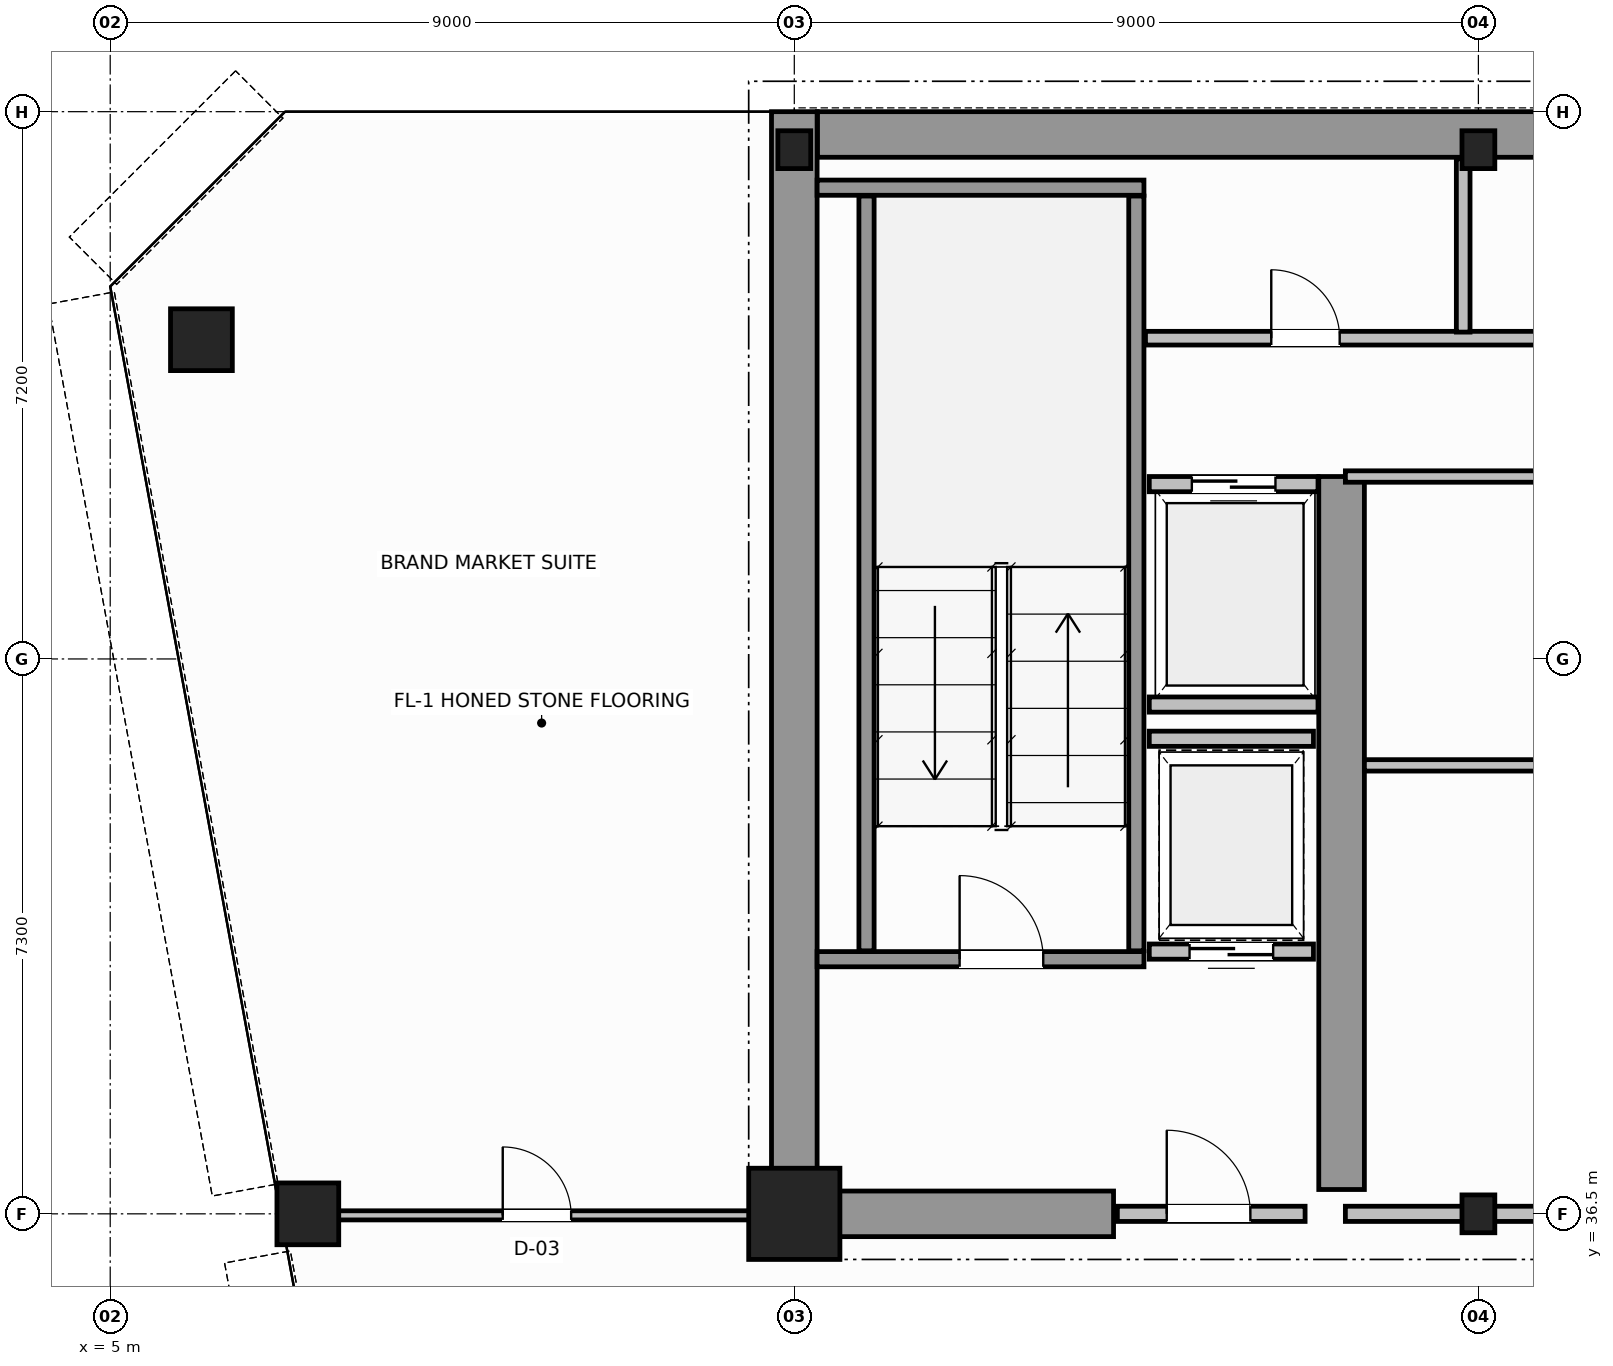
"""IFC4 building model, lengths in metres.
Left out: names, types, materials, properties, quantities, classifications, styles, units other than length and angle.
Written with IfcOpenShell. Run it as: python <this file> out.ifc"""

import sys

from ifc_helpers import new_model, si_unit, direction, frame, frame_2d, origin, origin_2d, place, context, subcontext, project, spatial, rectangle, hollow_circle, i_section, extrude, source, transform, mapped, element, fill, save


model = new_model("IFC4")
c1 = context("Model", 3, precision=1e-05, world=origin(), true_north=direction((0.0, 1.0)))
c2 = subcontext(c1, "Body", "Model", "MODEL_VIEW")
j1 = project(units=[si_unit("LENGTHUNIT", "METRE"), si_unit("PLANEANGLEUNIT", "RADIAN")], contexts=[c1])
p1 = place(None, origin())
s1 = spatial("IfcSite", under=j1, at=p1, CompositionType="ELEMENT")
p2 = place(p1, origin())
s2 = spatial("IfcBuilding", under=s1, at=p2, CompositionType="ELEMENT")
p3 = place(p2, frame((0.0, 0.0, 188.0)))
s3 = spatial("IfcBuildingStorey", under=s2, at=p3, CompositionType="ELEMENT", Elevation=188.0)
m1 = source(origin(), c2, "Body", "SweptSolid", [
    extrude(rectangle(XDim=1.2, YDim=1.2, at=origin_2d()), origin(), (0.0, 0.0, 1.0), 3.8),
])
p4 = place(p3, frame((14.0, 36.5, 0.0), z_axis=(0.0, 0.0, 1.0), x_axis=(1.0, 0.0, 0.0)))
e1 = element("IfcColumn", 1, at=p4, inside=s3, PredefinedType="COLUMN", context=c2, shape_type="MappedRepresentation", body=[
    mapped(m1, transform((0.0, 0.0, 0.0), scale=1.0)),
])
m2 = source(origin(), c2, "Body", "SweptSolid", [
    extrude(i_section(OverallWidth=0.432, OverallDepth=0.498, WebThickness=0.055, FlangeThickness=0.068, FilletRadius=0.015, at=origin_2d()), origin(), (0.0, 0.0, 1.0), 3.8),
])
for number, where, z_axis, x_axis in (
    (2, (23.0, 36.5, 0.0), (0.0, 0.0, 1.0), (1.0, 0.0, 0.0)),
    (3, (14.0, 50.5, 0.0), (0.0, 0.0, 1.0), (1.0, 0.0, 0.0)),
    (4, (23.0, 50.5, 0.0), (0.0, 0.0, 1.0), (1.0, 0.0, 0.0)),
):
    element("IfcColumn", number, at=place(p3, frame(where, z_axis=z_axis, x_axis=x_axis)), inside=s3, PredefinedType="COLUMN", context=c2, shape_type="MappedRepresentation", body=[
        mapped(m2, transform((0.0, 0.0, 0.0), scale=1.0)),
    ])
m3 = source(origin(), c2, "Body", "SweptSolid", [
    extrude(hollow_circle(Radius=0.406, WallThickness=0.04, at=origin_2d()), origin(), (0.0, 0.0, 1.0), 3.8),
])
for number, where, z_axis, x_axis in (
    (5, (6.2, 48.0, 0.0), (0.0, 0.0, 1.0), (1.0, 0.0, 0.0)),
    (6, (7.6, 36.5, 0.0), (0.0, 0.0, 1.0), (1.0, 0.0, 0.0)),
):
    element("IfcColumn", number, at=place(p3, frame(where, z_axis=z_axis, x_axis=x_axis)), inside=s3, PredefinedType="COLUMN", context=c2, shape_type="MappedRepresentation", body=[
        mapped(m3, transform((0.0, 0.0, 0.0), scale=1.0)),
    ])
p5 = place(p3, frame((14.304, 50.7, 0.0), z_axis=(0.0, 0.0, 1.0), x_axis=(1.0, 0.0, 0.0)))
e7 = element("IfcWall", 7, at=p5, inside=s3, PredefinedType="SHEAR", context=c2, shape_type="SweptSolid", body=[
    extrude(rectangle(XDim=19.694, YDim=0.6, at=frame_2d((9.847, 0.0))), origin(), (0.0, 0.0, 1.0), 3.8),
])
p6 = place(p3, frame((14.0, 36.5, 0.0), z_axis=(0.0, 0.0, 1.0), x_axis=(0.0, 1.0, 0.0)))
e8 = element("IfcWall", 8, at=p6, inside=s3, PredefinedType="SHEAR", context=c2, shape_type="SweptSolid", body=[
    extrude(rectangle(XDim=14.5, YDim=0.6, at=frame_2d((7.25, 0.0))), origin(), (0.0, 0.0, 1.0), 3.8),
])
p7 = place(p3, frame((14.32, 36.5, 0.0), z_axis=(0.0, 0.0, 1.0), x_axis=(1.0, 0.0, 0.0)))
e9 = element("IfcWall", 9, at=p7, inside=s3, PredefinedType="SHEAR", context=c2, shape_type="SweptSolid", body=[
    extrude(rectangle(XDim=3.88, YDim=0.6, at=frame_2d((1.94, 0.0))), origin(), (0.0, 0.0, 1.0), 2.58),
])
p8 = place(p3, frame((21.2, 36.82, 0.0), z_axis=(0.0, 0.0, 1.0), x_axis=(0.0, 1.0, 0.0)))
e10 = element("IfcWall", 10, at=p8, inside=s3, PredefinedType="SHEAR", context=c2, shape_type="SweptSolid", body=[
    extrude(rectangle(XDim=9.38, YDim=0.6, at=frame_2d((4.69, 0.0))), origin(), (0.0, 0.0, 1.0), 3.8),
])
p9 = place(p3, frame((14.3, 39.85, 0.0), z_axis=(0.0, 0.0, 1.0), x_axis=(1.0, 0.0, 0.0)))
e11 = element("IfcWall", 11, at=p9, inside=s3, PredefinedType="SOLIDWALL", context=c2, shape_type="SweptSolid", body=[
    extrude(rectangle(XDim=4.3, YDim=0.2, at=frame_2d((2.15, 0.0))), origin(), (0.0, 0.0, 1.0), 3.8),
])
p10 = place(p9, frame((1.875, 0.0, 0.0)))
e12 = element("IfcOpeningElement", 12, at=p10, cuts=e11, PredefinedType="OPENING", context=c2, shape_type="SweptSolid", body=[
    extrude(rectangle(XDim=1.1, YDim=2.15, at=frame_2d((0.55, 1.075))), frame((0.0, 0.11, 0.0), z_axis=(0.0, -1.0, 0.0), x_axis=(1.0, 0.0, 0.0)), (0.0, 0.0, 1.0), 0.22),
])
p11 = place(p3, frame((14.3, 50.0, 0.0), z_axis=(0.0, 0.0, 1.0), x_axis=(1.0, 0.0, 0.0)))
e13 = element("IfcWall", 13, at=p11, inside=s3, PredefinedType="SOLIDWALL", context=c2, shape_type="SweptSolid", body=[
    extrude(rectangle(XDim=4.3, YDim=0.2, at=frame_2d((2.15, 0.0))), origin(), (0.0, 0.0, 1.0), 3.8),
])
for number, where, z_axis, x_axis in (
    (14, (14.95, 39.96, 0.0), (0.0, 0.0, 1.0), (0.0, 1.0, 0.0)),
    (15, (18.5, 39.96, 0.0), (0.0, 0.0, 1.0), (0.0, 1.0, 0.0)),
):
    element("IfcWall", number, at=place(p3, frame(where, z_axis=z_axis, x_axis=x_axis)), inside=s3, PredefinedType="SOLIDWALL", context=c2, shape_type="SweptSolid", body=[
        extrude(rectangle(XDim=9.93, YDim=0.2, at=frame_2d((4.965, 0.0))), origin(), (0.0, 0.0, 1.0), 3.8),
    ])
p12 = place(p3, frame((18.25, 36.5, 0.0), z_axis=(0.0, 0.0, 1.0), x_axis=(1.0, 0.0, 0.0)))
e16 = element("IfcWall", 16, at=p12, inside=s3, PredefinedType="SOLIDWALL", context=c2, shape_type="SweptSolid", body=[
    extrude(rectangle(XDim=2.47, YDim=0.2, at=frame_2d((1.235, 0.0))), origin(), (0.0, 0.0, 1.0), 2.57),
])
p13 = place(p12, frame((0.65, 0.0, 0.0)))
e17 = element("IfcOpeningElement", 17, at=p13, cuts=e16, PredefinedType="OPENING", context=c2, shape_type="SweptSolid", body=[
    extrude(rectangle(XDim=1.1, YDim=2.15, at=frame_2d((0.55, 1.075))), frame((0.0, 0.11, 0.0), z_axis=(0.0, -1.0, 0.0), x_axis=(1.0, 0.0, 0.0)), (0.0, 0.0, 1.0), 0.22),
])
p14 = place(p3, frame((18.67, 46.1, 0.0), z_axis=(0.0, 0.0, 1.0), x_axis=(1.0, 0.0, 0.0)))
e18 = element("IfcWall", 18, at=p14, inside=s3, PredefinedType="SOLIDWALL", context=c2, shape_type="SweptSolid", body=[
    extrude(rectangle(XDim=2.22, YDim=0.2, at=frame_2d((1.11, 0.0))), origin(), (0.0, 0.0, 1.0), 3.58),
])
p15 = place(p14, frame((0.56, 0.0, 0.0)))
e19 = element("IfcOpeningElement", 19, at=p15, cuts=e18, PredefinedType="OPENING", context=c2, shape_type="SweptSolid", body=[
    extrude(rectangle(XDim=1.1, YDim=2.15, at=frame_2d((0.55, 1.075))), frame((0.0, 0.11, 0.0), z_axis=(0.0, -1.0, 0.0), x_axis=(1.0, 0.0, 0.0)), (0.0, 0.0, 1.0), 0.22),
])
p16 = place(p3, frame((18.67, 43.2, 0.0), z_axis=(0.0, 0.0, 1.0), x_axis=(1.0, 0.0, 0.0)))
e20 = element("IfcWall", 20, at=p16, inside=s3, PredefinedType="SOLIDWALL", context=c2, shape_type="SweptSolid", body=[
    extrude(rectangle(XDim=2.22, YDim=0.2, at=frame_2d((1.11, 0.0))), origin(), (0.0, 0.0, 1.0), 3.58),
])
p17 = place(p3, frame((18.67, 39.95, 0.0), z_axis=(0.0, 0.0, 1.0), x_axis=(1.0, 0.0, 0.0)))
e21 = element("IfcWall", 21, at=p17, inside=s3, PredefinedType="SOLIDWALL", context=c2, shape_type="SweptSolid", body=[
    extrude(rectangle(XDim=2.16, YDim=0.2, at=frame_2d((1.08, 0.0))), origin(), (0.0, 0.0, 1.0), 3.58),
])
p18 = place(p17, frame((0.53, 0.0, 0.0)))
e22 = element("IfcOpeningElement", 22, at=p18, cuts=e21, PredefinedType="OPENING", context=c2, shape_type="SweptSolid", body=[
    extrude(rectangle(XDim=1.1, YDim=2.15, at=frame_2d((0.55, 1.075))), frame((0.0, 0.11, 0.0), z_axis=(0.0, -1.0, 0.0), x_axis=(1.0, 0.0, 0.0)), (0.0, 0.0, 1.0), 0.22),
])
p19 = place(p3, frame((18.67, 42.75, 0.0), z_axis=(0.0, 0.0, 1.0), x_axis=(1.0, 0.0, 0.0)))
e23 = element("IfcWall", 23, at=p19, inside=s3, PredefinedType="SOLIDWALL", context=c2, shape_type="SweptSolid", body=[
    extrude(rectangle(XDim=2.16, YDim=0.2, at=frame_2d((1.08, 0.0))), origin(), (0.0, 0.0, 1.0), 3.58),
])
p20 = place(p3, frame((21.25, 36.5, 0.0), z_axis=(0.0, 0.0, 1.0), x_axis=(1.0, 0.0, 0.0)))
e24 = element("IfcWall", 24, at=p20, inside=s3, PredefinedType="SOLIDWALL", context=c2, shape_type="SweptSolid", body=[
    extrude(rectangle(XDim=6.27, YDim=0.2, at=frame_2d((3.135, 0.0))), origin(), (0.0, 0.0, 1.0), 2.57),
])
p21 = place(p20, frame((2.6, 0.0, 0.0)))
e25 = element("IfcOpeningElement", 25, at=p21, cuts=e24, PredefinedType="OPENING", context=c2, shape_type="SweptSolid", body=[
    extrude(rectangle(XDim=1.1, YDim=2.15, at=frame_2d((0.55, 1.075))), frame((0.0, 0.11, 0.0), z_axis=(0.0, -1.0, 0.0), x_axis=(1.0, 0.0, 0.0)), (0.0, 0.0, 1.0), 0.22),
])
p22 = place(p3, frame((21.25, 46.2, 0.0), z_axis=(0.0, 0.0, 1.0), x_axis=(1.0, 0.0, 0.0)))
e26 = element("IfcWall", 26, at=p22, inside=s3, PredefinedType="PARTITIONING", context=c2, shape_type="SweptSolid", body=[
    extrude(rectangle(XDim=8.5, YDim=0.15, at=frame_2d((4.25, 0.0))), origin(), (0.0, 0.0, 1.0), 3.58),
])
p23 = place(p3, frame((21.5, 42.4, 0.0), z_axis=(0.0, 0.0, 1.0), x_axis=(1.0, 0.0, 0.0)))
e27 = element("IfcWall", 27, at=p23, inside=s3, PredefinedType="PARTITIONING", context=c2, shape_type="SweptSolid", body=[
    extrude(rectangle(XDim=8.0, YDim=0.15, at=frame_2d((4.0, 0.0))), origin(), (0.0, 0.0, 1.0), 3.58),
])
p24 = place(p23, frame((3.4, 0.0, 0.0)))
e28 = element("IfcOpeningElement", 28, at=p24, cuts=e27, PredefinedType="OPENING", context=c2, shape_type="SweptSolid", body=[
    extrude(rectangle(XDim=0.9, YDim=2.1, at=frame_2d((0.45, 1.05))), frame((0.0, 0.085, 0.0), z_axis=(0.0, -1.0, 0.0), x_axis=(1.0, 0.0, 0.0)), (0.0, 0.0, 1.0), 0.17),
])
p25 = place(p3, frame((18.62, 48.02, 0.0), z_axis=(0.0, 0.0, 1.0), x_axis=(1.0, 0.0, 0.0)))
e29 = element("IfcWall", 29, at=p25, inside=s3, PredefinedType="PLUMBINGWALL", context=c2, shape_type="SweptSolid", body=[
    extrude(rectangle(XDim=30.76, YDim=0.18, at=frame_2d((15.38, 0.0))), origin(), (0.0, 0.0, 1.0), 3.58),
])
p26 = place(p25, frame((1.655, 0.0, 0.0)))
e30 = element("IfcOpeningElement", 30, at=p26, cuts=e29, PredefinedType="OPENING", context=c2, shape_type="SweptSolid", body=[
    extrude(rectangle(XDim=0.9, YDim=2.15, at=frame_2d((0.45, 1.075))), frame((0.0, 0.1, 0.0), z_axis=(0.0, -1.0, 0.0), x_axis=(1.0, 0.0, 0.0)), (0.0, 0.0, 1.0), 0.2),
])
p27 = place(p25, frame((6.03, 0.0, 0.0)))
e31 = element("IfcOpeningElement", 31, at=p27, cuts=e29, PredefinedType="OPENING", context=c2, shape_type="SweptSolid", body=[
    extrude(rectangle(XDim=0.9, YDim=2.15, at=frame_2d((0.45, 1.075))), frame((0.0, 0.1, 0.0), z_axis=(0.0, -1.0, 0.0), x_axis=(1.0, 0.0, 0.0)), (0.0, 0.0, 1.0), 0.2),
])
p28 = place(p25, frame((10.93, 0.0, 0.0)))
e32 = element("IfcOpeningElement", 32, at=p28, cuts=e29, PredefinedType="OPENING", context=c2, shape_type="SweptSolid", body=[
    extrude(rectangle(XDim=0.9, YDim=2.15, at=frame_2d((0.45, 1.075))), frame((0.0, 0.1, 0.0), z_axis=(0.0, -1.0, 0.0), x_axis=(1.0, 0.0, 0.0)), (0.0, 0.0, 1.0), 0.2),
])
p29 = place(p25, frame((16.13, 0.0, 0.0)))
e33 = element("IfcOpeningElement", 33, at=p29, cuts=e29, PredefinedType="OPENING", context=c2, shape_type="SweptSolid", body=[
    extrude(rectangle(XDim=0.9, YDim=2.15, at=frame_2d((0.45, 1.075))), frame((0.0, 0.1, 0.0), z_axis=(0.0, -1.0, 0.0), x_axis=(1.0, 0.0, 0.0)), (0.0, 0.0, 1.0), 0.2),
])
p30 = place(p25, frame((21.73, 0.0, 0.0)))
e34 = element("IfcOpeningElement", 34, at=p30, cuts=e29, PredefinedType="OPENING", context=c2, shape_type="SweptSolid", body=[
    extrude(rectangle(XDim=0.9, YDim=2.15, at=frame_2d((0.45, 1.075))), frame((0.0, 0.1, 0.0), z_axis=(0.0, -1.0, 0.0), x_axis=(1.0, 0.0, 0.0)), (0.0, 0.0, 1.0), 0.2),
])
p31 = place(p25, frame((27.505, 0.0, 0.0)))
e35 = element("IfcOpeningElement", 35, at=p31, cuts=e29, PredefinedType="OPENING", context=c2, shape_type="SweptSolid", body=[
    extrude(rectangle(XDim=0.9, YDim=2.15, at=frame_2d((0.45, 1.075))), frame((0.0, 0.1, 0.0), z_axis=(0.0, -1.0, 0.0), x_axis=(1.0, 0.0, 0.0)), (0.0, 0.0, 1.0), 0.2),
])
p32 = place(p3, frame((22.8, 48.1, 0.0), z_axis=(0.0, 0.0, 1.0), x_axis=(0.0, 1.0, 0.0)))
e36 = element("IfcWall", 36, at=p32, inside=s3, PredefinedType="PLUMBINGWALL", context=c2, shape_type="SweptSolid", body=[
    extrude(rectangle(XDim=2.28, YDim=0.18, at=frame_2d((1.14, 0.0))), origin(), (0.0, 0.0, 1.0), 2.97),
])
p33 = place(p3, frame((7.289, 36.48, 0.0), z_axis=(0.0, 0.0, 1.0), x_axis=(1.0, 0.0, 0.0)))
e37 = element("IfcWall", 37, at=p33, inside=s3, PredefinedType="PARTITIONING", context=c2, shape_type="SweptSolid", body=[
    extrude(rectangle(XDim=6.651, YDim=0.12, at=frame_2d((3.325, 0.0))), origin(), (0.0, 0.0, 1.0), 2.97),
])
p34 = place(p33, frame((2.875, 0.0, 0.0)))
e38 = element("IfcOpeningElement", 38, at=p34, cuts=e37, PredefinedType="OPENING", context=c2, shape_type="SweptSolid", body=[
    extrude(rectangle(XDim=0.9, YDim=2.15, at=frame_2d((0.45, 1.075))), frame((0.0, 0.07, 0.0), z_axis=(0.0, -1.0, 0.0), x_axis=(1.0, 0.0, 0.0)), (0.0, 0.0, 1.0), 0.14),
])
m4 = source(origin(), c2, "Body", "SweptSolid", [
    extrude(rectangle(XDim=1.1, YDim=2.15, at=frame_2d((0.55, 1.075))), frame((0.0, 0.025, 0.0), z_axis=(0.0, -1.0, 0.0), x_axis=(1.0, 0.0, 0.0)), (0.0, 0.0, 1.0), 0.05),
])
p35 = place(p10, origin())
e39 = element("IfcDoor", 39, at=p35, inside=s3, OperationType="SINGLE_SWING_LEFT", PredefinedType="DOOR", context=c2, shape_type="MappedRepresentation", body=[
    mapped(m4, transform((0.0, 0.0, 0.0), scale=1.0)),
])
fill(e12, e39)
p36 = place(p13, origin())
e40 = element("IfcDoor", 40, at=p36, inside=s3, OperationType="SINGLE_SWING_RIGHT", PredefinedType="DOOR", context=c2, shape_type="MappedRepresentation", body=[
    mapped(m4, transform((0.0, 0.0, 0.0), scale=1.0)),
])
fill(e17, e40)
p37 = place(p15, origin())
e41 = element("IfcDoor", 41, at=p37, inside=s3, OperationType="DOUBLE_DOOR_SLIDING", PredefinedType="DOOR", context=c2, shape_type="MappedRepresentation", body=[
    mapped(m4, transform((0.0, 0.0, 0.0), scale=1.0)),
])
fill(e19, e41)
p38 = place(p18, origin())
e42 = element("IfcDoor", 42, at=p38, inside=s3, OperationType="DOUBLE_DOOR_SLIDING", PredefinedType="DOOR", context=c2, shape_type="MappedRepresentation", body=[
    mapped(m4, transform((0.0, 0.0, 0.0), scale=1.0)),
])
fill(e22, e42)
m5 = source(origin(), c2, "Body", "SweptSolid", [
    extrude(rectangle(XDim=0.9, YDim=2.15, at=frame_2d((0.45, 1.075))), frame((0.0, 0.025, 0.0), z_axis=(0.0, -1.0, 0.0), x_axis=(1.0, 0.0, 0.0)), (0.0, 0.0, 1.0), 0.05),
])
p39 = place(p26, origin())
e43 = element("IfcDoor", 43, at=p39, inside=s3, OperationType="SINGLE_SWING_LEFT", PredefinedType="DOOR", context=c2, shape_type="MappedRepresentation", body=[
    mapped(m5, transform((0.0, 0.0, 0.0), scale=1.0)),
])
fill(e30, e43)
p40 = place(p34, origin())
e44 = element("IfcDoor", 44, at=p40, inside=s3, OperationType="SINGLE_SWING_LEFT", PredefinedType="DOOR", context=c2, shape_type="MappedRepresentation", body=[
    mapped(m5, transform((0.0, 0.0, 0.0), scale=1.0)),
])
fill(e38, e44)
save(model, sys.argv[1])
